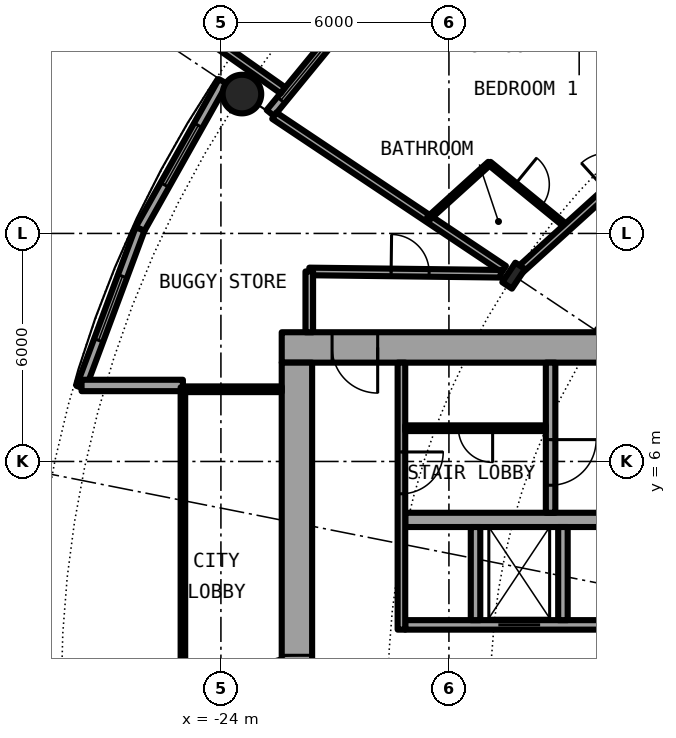
"""IFC4 building model, lengths in metres.
Left out: names, types, materials, properties, quantities, classifications, styles, units other than length and angle.
Written with IfcOpenShell. Run it as: python <this file> out.ifc"""

import sys

from ifc_helpers import new_model, si_unit, direction, frame, frame_2d, origin, origin_2d, place, context, subcontext, project, spatial, rectangle, hollow_circle, i_section, extrude, element, fill, save


model = new_model("IFC4")
c1 = context("Model", 3, precision=1e-05, world=origin(), true_north=direction((0.0, 1.0)))
c2 = subcontext(c1, "Body", "Model", "MODEL_VIEW")
j1 = project(units=[si_unit("LENGTHUNIT", "METRE"), si_unit("PLANEANGLEUNIT", "RADIAN")], contexts=[c1])
p1 = place(None, origin())
s1 = spatial("IfcSite", under=j1, at=p1, CompositionType="ELEMENT")
p2 = place(p1, origin())
s2 = spatial("IfcBuilding", under=s1, at=p2, CompositionType="ELEMENT")
p3 = place(p2, frame((0.0, 0.0, 35.0)))
s3 = spatial("IfcBuildingStorey", under=s2, at=p3, CompositionType="ELEMENT", Elevation=35.0)
p4 = place(p3, frame((-23.448, 15.667, 0.0), z_axis=(0.0, 0.0, 1.0), x_axis=(1.0, 0.0, 0.0)))
e1 = element("IfcColumn", 1, at=p4, inside=s3, PredefinedType="COLUMN", context=c2, shape_type="SweptSolid", body=[
    extrude(hollow_circle(Radius=0.508, WallThickness=0.05, at=origin_2d()), origin(), (0.0, 0.0, 1.0), 3.05),
])
p5 = place(p3, frame((-16.297, 10.889, 0.0), z_axis=(0.0, 0.0, 1.0), x_axis=(-0.831469612303, 0.55557023302, 0.0)))
e2 = element("IfcColumn", 2, at=p5, inside=s3, PredefinedType="COLUMN", context=c2, shape_type="SweptSolid", body=[
    extrude(i_section(OverallWidth=0.305, OverallDepth=0.62, WebThickness=0.021, FlangeThickness=0.04, FilletRadius=0.027, at=origin_2d()), origin(), (0.0, 0.0, 1.0), 3.05),
])
p6 = place(p3, frame((-19.304, 19.304, 0.0), z_axis=(0.0, 0.0, 1.0), x_axis=(-0.634382322723, -0.773019449054, 0.0)))
e3 = element("IfcWall", 3, at=p6, inside=s3, PredefinedType="SOLIDWALL", context=c2, shape_type="SweptSolid", body=[
    extrude(rectangle(XDim=5.352, YDim=0.25, at=frame_2d((2.676, 0.0))), origin(), (0.0, 0.0, 1.0), 2.7),
])
p7 = place(p6, frame((0.841, 0.0, 0.0)))
e4 = element("IfcOpeningElement", 4, at=p7, cuts=e3, PredefinedType="OPENING", context=c2, shape_type="SweptSolid", body=[
    extrude(rectangle(XDim=1.0, YDim=2.2, at=frame_2d((0.5, 1.1))), frame((0.0, 0.135, 0.0), z_axis=(0.0, -1.0, 0.0), x_axis=(1.0, 0.0, 0.0)), (0.0, 0.0, 1.0), 0.27),
])
p8 = place(p6, frame((3.111, 0.0, 0.3)))
e5 = element("IfcOpeningElement", 5, at=p8, cuts=e3, PredefinedType="OPENING", context=c2, shape_type="SweptSolid", body=[
    extrude(rectangle(XDim=1.8, YDim=2.1, at=frame_2d((0.9, 1.05))), frame((0.0, 0.135, 0.0), z_axis=(0.0, -1.0, 0.0), x_axis=(1.0, 0.0, 0.0)), (0.0, 0.0, 1.0), 0.27),
])
p9 = place(p3, frame((-22.37, 15.765, -0.03), z_axis=(0.0, 0.0, 1.0), x_axis=(-0.817256123454, 0.576274612209, 0.0)))
e6 = element("IfcWall", 6, at=p9, inside=s3, PredefinedType="SOLIDWALL", context=c2, shape_type="SweptSolid", body=[
    extrude(rectangle(XDim=2.933, YDim=0.2, at=frame_2d((1.466, 0.0))), origin(), (0.0, 0.0, 1.0), 2.73),
])
p10 = place(p3, frame((-23.946, 16.0, 0.0), z_axis=(0.0, 0.0, 1.0), x_axis=(-0.489696356642, -0.871893042919, 0.0)))
e7 = element("IfcWall", 7, at=p10, inside=s3, PredefinedType="SOLIDWALL", context=c2, shape_type="SweptSolid", body=[
    extrude(rectangle(XDim=4.454, YDim=0.25, at=frame_2d((2.227, 0.0))), origin(), (0.0, 0.0, 1.0), 2.7),
])
p11 = place(p10, frame((1.327, 0.0, 0.3)))
e8 = element("IfcOpeningElement", 8, at=p11, cuts=e7, PredefinedType="OPENING", context=c2, shape_type="SweptSolid", body=[
    extrude(rectangle(XDim=1.8, YDim=2.1, at=frame_2d((0.9, 1.05))), frame((0.0, 0.135, 0.0), z_axis=(0.0, -1.0, 0.0), x_axis=(1.0, 0.0, 0.0)), (0.0, 0.0, 1.0), 0.27),
])
p12 = place(p3, frame((-26.127, 12.117, 0.0), z_axis=(0.0, 0.0, 1.0), x_axis=(-0.349247811493, -0.937030397675, 0.0)))
e9 = element("IfcWall", 9, at=p12, inside=s3, PredefinedType="SOLIDWALL", context=c2, shape_type="SweptSolid", body=[
    extrude(rectangle(XDim=4.452, YDim=0.25, at=frame_2d((2.226, 0.0))), origin(), (0.0, 0.0, 1.0), 2.7),
])
p13 = place(p12, frame((1.327, 0.0, 0.3)))
e10 = element("IfcOpeningElement", 10, at=p13, cuts=e9, PredefinedType="OPENING", context=c2, shape_type="SweptSolid", body=[
    extrude(rectangle(XDim=1.8, YDim=2.1, at=frame_2d((0.9, 1.05))), frame((0.0, 0.135, 0.0), z_axis=(0.0, -1.0, 0.0), x_axis=(1.0, 0.0, 0.0)), (0.0, 0.0, 1.0), 0.27),
])
p14 = place(p3, frame((-25.0, 8.0, 0.0), z_axis=(0.0, 0.0, 1.0), x_axis=(-1.0, 0.0, 0.0)))
e11 = element("IfcWall", 11, at=p14, inside=s3, PredefinedType="SOLIDWALL", context=c2, shape_type="SweptSolid", body=[
    extrude(rectangle(XDim=2.667, YDim=0.3, at=frame_2d((1.333, 0.0))), origin(), (0.0, 0.0, 1.0), 2.7),
])
p15 = place(p3, frame((-8.2, 9.0, 0.0), z_axis=(0.0, 0.0, 1.0), x_axis=(-1.0, 0.0, 0.0)))
e12 = element("IfcWall", 12, at=p15, inside=s3, PredefinedType="SHEAR", context=c2, shape_type="SweptSolid", body=[
    extrude(rectangle(XDim=14.2, YDim=0.8, at=frame_2d((7.1, 0.0))), origin(), (0.0, 0.0, 1.0), 3.05),
])
p16 = place(p15, frame((11.675, 0.0, 0.0)))
e13 = element("IfcOpeningElement", 13, at=p16, cuts=e12, PredefinedType="OPENING", context=c2, shape_type="SweptSolid", body=[
    extrude(rectangle(XDim=1.2, YDim=2.3, at=frame_2d((0.6, 1.15))), frame((0.0, 0.41, 0.0), z_axis=(0.0, -1.0, 0.0), x_axis=(1.0, 0.0, 0.0)), (0.0, 0.0, 1.0), 0.82),
])
p17 = place(p3, frame((-22.0, -8.6, 0.0), z_axis=(0.0, 0.0, 1.0), x_axis=(0.0, 1.0, 0.0)))
e14 = element("IfcWall", 14, at=p17, inside=s3, PredefinedType="SHEAR", context=c2, shape_type="SweptSolid", body=[
    extrude(rectangle(XDim=17.2, YDim=0.8, at=frame_2d((8.6, 0.0))), origin(), (0.0, 0.0, 1.0), 3.05),
])
p18 = place(p17, frame((7.7, 0.0, 0.0)))
e15 = element("IfcOpeningElement", 15, at=p18, cuts=e14, PredefinedType="OPENING", context=c2, shape_type="SweptSolid", body=[
    extrude(rectangle(XDim=1.8, YDim=2.3, at=frame_2d((0.9, 1.15))), frame((0.0, 0.41, 0.0), z_axis=(0.0, -1.0, 0.0), x_axis=(1.0, 0.0, 0.0)), (0.0, 0.0, 1.0), 0.82),
])
p19 = place(p3, frame((-19.15, 1.7, 0.0), z_axis=(0.0, 0.0, 1.0), x_axis=(1.0, 0.0, 0.0)))
e16 = element("IfcWall", 16, at=p19, inside=s3, PredefinedType="SHEAR", context=c2, shape_type="SweptSolid", body=[
    extrude(rectangle(XDim=10.15, YDim=0.25, at=frame_2d((5.075, 0.0))), origin(), (0.0, 0.0, 1.0), 3.05),
])
p20 = place(p19, frame((2.45, 0.0, 0.0)))
e17 = element("IfcOpeningElement", 17, at=p20, cuts=e16, PredefinedType="OPENING", context=c2, shape_type="SweptSolid", body=[
    extrude(rectangle(XDim=1.1, YDim=2.3, at=frame_2d((0.55, 1.15))), frame((0.0, 0.135, 0.0), z_axis=(0.0, -1.0, 0.0), x_axis=(1.0, 0.0, 0.0)), (0.0, 0.0, 1.0), 0.27),
])
p21 = place(p19, frame((9.137, 0.0, 0.0)))
e18 = element("IfcOpeningElement", 18, at=p21, cuts=e16, PredefinedType="OPENING", context=c2, shape_type="SweptSolid", body=[
    extrude(rectangle(XDim=0.9, YDim=2.3, at=frame_2d((0.45, 1.15))), frame((0.0, 0.135, 0.0), z_axis=(0.0, -1.0, 0.0), x_axis=(1.0, 0.0, 0.0)), (0.0, 0.0, 1.0), 0.27),
])
p22 = place(p19, frame((7.5, 0.0, 0.0)))
e19 = element("IfcOpeningElement", 19, at=p22, cuts=e16, PredefinedType="OPENING", context=c2, shape_type="SweptSolid", body=[
    extrude(rectangle(XDim=0.9, YDim=2.3, at=frame_2d((0.45, 1.15))), frame((0.0, 0.135, 0.0), z_axis=(0.0, -1.0, 0.0), x_axis=(1.0, 0.0, 0.0)), (0.0, 0.0, 1.0), 0.27),
])
p23 = place(p19, frame((5.125, 0.0, 0.0)))
e20 = element("IfcOpeningElement", 20, at=p23, cuts=e16, PredefinedType="OPENING", context=c2, shape_type="SweptSolid", body=[
    extrude(rectangle(XDim=0.9, YDim=2.3, at=frame_2d((0.45, 1.15))), frame((0.0, 0.135, 0.0), z_axis=(0.0, -1.0, 0.0), x_axis=(1.0, 0.0, 0.0)), (0.0, 0.0, 1.0), 0.27),
])
p24 = place(p3, frame((-9.0, 4.462, 0.0), z_axis=(0.0, 0.0, 1.0), x_axis=(-1.0, 0.0, 0.0)))
e21 = element("IfcWall", 21, at=p24, inside=s3, PredefinedType="SHEAR", context=c2, shape_type="SweptSolid", body=[
    extrude(rectangle(XDim=10.15, YDim=0.375, at=frame_2d((5.075, 0.0))), origin(), (0.0, 0.0, 1.0), 3.05),
])
p25 = place(p3, frame((-15.325, 8.6, 0.0), z_axis=(0.0, 0.0, 1.0), x_axis=(0.0, -1.0, 0.0)))
e22 = element("IfcWall", 22, at=p25, inside=s3, PredefinedType="SHEAR", context=c2, shape_type="SweptSolid", body=[
    extrude(rectangle(XDim=3.95, YDim=0.25, at=frame_2d((1.975, 0.0))), origin(), (0.0, 0.0, 1.0), 3.05),
])
p26 = place(p25, frame((2.025, 0.0, 0.0)))
e23 = element("IfcOpeningElement", 23, at=p26, cuts=e22, PredefinedType="OPENING", context=c2, shape_type="SweptSolid", body=[
    extrude(rectangle(XDim=1.2, YDim=2.3, at=frame_2d((0.6, 1.15))), frame((0.0, 0.135, 0.0), z_axis=(0.0, -1.0, 0.0), x_axis=(1.0, 0.0, 0.0)), (0.0, 0.0, 1.0), 0.27),
])
for number, where, z_axis, x_axis in (
    (24, (-15.0, 1.825, 0.0), (0.0, 0.0, 1.0), (0.0, 1.0, 0.0)),
    (25, (-17.3, 1.825, 0.0), (0.0, 0.0, 1.0), (0.0, 1.0, 0.0)),
):
    element("IfcWall", number, at=place(p3, frame(where, z_axis=z_axis, x_axis=x_axis)), inside=s3, PredefinedType="SOLIDWALL", context=c2, shape_type="SweptSolid", body=[
        extrude(rectangle(XDim=2.45, YDim=0.25, at=frame_2d((1.225, 0.0))), origin(), (0.0, 0.0, 1.0), 2.7),
    ])
p27 = place(p3, frame((-19.25, 8.6, 0.0), z_axis=(0.0, 0.0, 1.0), x_axis=(0.0, -1.0, 0.0)))
e26 = element("IfcWall", 26, at=p27, inside=s3, PredefinedType="SOLIDWALL", context=c2, shape_type="SweptSolid", body=[
    extrude(rectangle(XDim=7.025, YDim=0.2, at=frame_2d((3.513, 0.0))), origin(), (0.0, 0.0, 1.0), 2.7),
])
p28 = place(p27, frame((2.35, 0.0, 0.0)))
e27 = element("IfcOpeningElement", 27, at=p28, cuts=e26, PredefinedType="OPENING", context=c2, shape_type="SweptSolid", body=[
    extrude(rectangle(XDim=1.1, YDim=2.3, at=frame_2d((0.55, 1.15))), frame((0.0, 0.11, 0.0), z_axis=(0.0, -1.0, 0.0), x_axis=(1.0, 0.0, 0.0)), (0.0, 0.0, 1.0), 0.22),
])
p29 = place(p3, frame((-15.45, 6.875, 0.0), z_axis=(0.0, 0.0, 1.0), x_axis=(-1.0, 0.0, 0.0)))
e28 = element("IfcWall", 28, at=p29, inside=s3, PredefinedType="PARTITIONING", context=c2, shape_type="SweptSolid", body=[
    extrude(rectangle(XDim=3.7, YDim=0.15, at=frame_2d((1.85, 0.0))), origin(), (0.0, 0.0, 1.0), 2.7),
])
p30 = place(p29, frame((1.4, 0.0, 0.0)))
e29 = element("IfcOpeningElement", 29, at=p30, cuts=e28, PredefinedType="OPENING", context=c2, shape_type="SweptSolid", body=[
    extrude(rectangle(XDim=0.9, YDim=2.3, at=frame_2d((0.45, 1.15))), frame((0.0, 0.085, 0.0), z_axis=(0.0, -1.0, 0.0), x_axis=(1.0, 0.0, 0.0)), (0.0, 0.0, 1.0), 0.17),
])
p31 = place(p3, frame((-22.4, 7.9, 0.0), z_axis=(0.0, 0.0, 1.0), x_axis=(-1.0, 0.0, 0.0)))
e30 = element("IfcWall", 30, at=p31, inside=s3, PredefinedType="PARTITIONING", context=c2, shape_type="SweptSolid", body=[
    extrude(rectangle(XDim=2.54, YDim=0.15, at=frame_2d((1.27, 0.0))), origin(), (0.0, 0.0, 1.0), 2.7),
])
p32 = place(p3, frame((-25.0, 7.95, 0.0), z_axis=(0.0, 0.0, 1.0), x_axis=(0.0, -1.0, 0.0)))
e31 = element("IfcWall", 31, at=p32, inside=s3, PredefinedType="PARTITIONING", context=c2, shape_type="SweptSolid", body=[
    extrude(rectangle(XDim=15.9, YDim=0.12, at=frame_2d((7.95, 0.0))), origin(), (0.0, 0.0, 1.0), 2.7),
])
p33 = place(p32, frame((0.95, 0.0, 0.1)))
e32 = element("IfcOpeningElement", 32, at=p33, cuts=e31, PredefinedType="OPENING", context=c2, shape_type="SweptSolid", body=[
    extrude(rectangle(XDim=14.0, YDim=2.35, at=frame_2d((7.0, 1.175))), frame((0.0, 0.07, 0.0), z_axis=(0.0, -1.0, 0.0), x_axis=(1.0, 0.0, 0.0)), (0.0, 0.0, 1.0), 0.14),
])
p34 = place(p3, frame((-22.595, 15.098, 0.0), z_axis=(0.0, 0.0, 1.0), x_axis=(0.831403467378, -0.55566921314, 0.0)))
e33 = element("IfcWall", 33, at=p34, inside=s3, PredefinedType="PARTITIONING", context=c2, shape_type="SweptSolid", body=[
    extrude(rectangle(XDim=7.265, YDim=0.2, at=frame_2d((3.632, 0.0))), origin(), (0.0, 0.0, 1.0), 2.7),
])
p35 = place(p3, frame((-17.219, 21.023, 0.0), z_axis=(0.0, 0.0, 1.0), x_axis=(0.633664062855, -0.773608334654, 0.0)))
e34 = element("IfcWall", 34, at=p35, inside=s3, PredefinedType="PARTITIONING", context=c2, shape_type="SweptSolid", body=[
    extrude(rectangle(XDim=8.138, YDim=0.1, at=frame_2d((4.069, 0.0))), origin(), (0.0, 0.0, 1.0), 2.7),
])
p36 = place(p35, frame((6.377, 0.0, 0.0)))
e35 = element("IfcOpeningElement", 35, at=p36, cuts=e34, PredefinedType="OPENING", context=c2, shape_type="SweptSolid", body=[
    extrude(rectangle(XDim=0.9, YDim=2.3, at=frame_2d((0.45, 1.15))), frame((0.0, 0.06, 0.0), z_axis=(0.0, -1.0, 0.0), x_axis=(1.0, 0.0, 0.0)), (0.0, 0.0, 1.0), 0.12),
])
p37 = place(p35, frame((2.308, 0.0, 0.0)))
e36 = element("IfcOpeningElement", 36, at=p37, cuts=e34, PredefinedType="OPENING", context=c2, shape_type="SweptSolid", body=[
    extrude(rectangle(XDim=0.9, YDim=2.3, at=frame_2d((0.45, 1.15))), frame((0.0, 0.06, 0.0), z_axis=(0.0, -1.0, 0.0), x_axis=(1.0, 0.0, 0.0)), (0.0, 0.0, 1.0), 0.12),
])
p38 = place(p3, frame((-16.936, 13.845, 0.0), z_axis=(0.0, 0.0, 1.0), x_axis=(0.774162545943, -0.632986850147, 0.0)))
e37 = element("IfcWall", 37, at=p38, inside=s3, PredefinedType="PARTITIONING", context=c2, shape_type="SweptSolid", body=[
    extrude(rectangle(XDim=2.649, YDim=0.1, at=frame_2d((1.325, 0.0))), origin(), (0.0, 0.0, 1.0), 2.7),
])
p39 = place(p38, frame((0.875, 0.0, 0.0)))
e38 = element("IfcOpeningElement", 38, at=p39, cuts=e37, PredefinedType="OPENING", context=c2, shape_type="SweptSolid", body=[
    extrude(rectangle(XDim=0.9, YDim=2.3, at=frame_2d((0.45, 1.15))), frame((0.0, 0.06, 0.0), z_axis=(0.0, -1.0, 0.0), x_axis=(1.0, 0.0, 0.0)), (0.0, 0.0, 1.0), 0.12),
])
p40 = place(p3, frame((-21.675, 11.0, 0.0), z_axis=(0.0, 0.0, 1.0), x_axis=(0.999926652916, -0.012111514691, 0.0)))
e39 = element("IfcWall", 39, at=p40, inside=s3, PredefinedType="PARTITIONING", context=c2, shape_type="SweptSolid", body=[
    extrude(rectangle(XDim=5.04, YDim=0.2, at=frame_2d((2.52, 0.0))), origin(), (0.0, 0.0, 1.0), 2.7),
])
p41 = place(p40, frame((2.154, 0.0, 0.0)))
e40 = element("IfcOpeningElement", 40, at=p41, cuts=e39, PredefinedType="OPENING", context=c2, shape_type="SweptSolid", body=[
    extrude(rectangle(XDim=1.0, YDim=2.3, at=frame_2d((0.5, 1.15))), frame((0.0, 0.11, 0.0), z_axis=(0.0, -1.0, 0.0), x_axis=(1.0, 0.0, 0.0)), (0.0, 0.0, 1.0), 0.22),
])
p42 = place(p3, frame((-16.18, 10.995, 0.0), z_axis=(0.0, 0.0, 1.0), x_axis=(0.74112906966, 0.671362571272, 0.0)))
e41 = element("IfcWall", 41, at=p42, inside=s3, PredefinedType="PARTITIONING", context=c2, shape_type="SweptSolid", body=[
    extrude(rectangle(XDim=9.375, YDim=0.2, at=frame_2d((4.688, 0.0))), origin(), (0.0, 0.0, 1.0), 2.38),
])
p43 = place(p42, frame((3.152, 0.0, 0.0)))
e42 = element("IfcOpeningElement", 42, at=p43, cuts=e41, PredefinedType="OPENING", context=c2, shape_type="SweptSolid", body=[
    extrude(rectangle(XDim=1.0, YDim=2.3, at=frame_2d((0.5, 1.15))), frame((0.0, 0.11, 0.0), z_axis=(0.0, -1.0, 0.0), x_axis=(1.0, 0.0, 0.0)), (0.0, 0.0, 1.0), 0.22),
])
p44 = place(p3, frame((-18.54, 12.392, 0.0), z_axis=(0.0, 0.0, 1.0), x_axis=(0.741319612235, 0.671152167929, 0.0)))
e43 = element("IfcWall", 43, at=p44, inside=s3, PredefinedType="PARTITIONING", context=c2, shape_type="SweptSolid", body=[
    extrude(rectangle(XDim=2.168, YDim=0.1, at=frame_2d((1.084, 0.0))), origin(), (0.0, 0.0, 1.0), 2.7),
])
p45 = place(p3, frame((-21.675, 9.4, 0.0), z_axis=(0.0, 0.0, 1.0), x_axis=(0.0, 1.0, 0.0)))
e44 = element("IfcWall", 44, at=p45, inside=s3, PredefinedType="PARTITIONING", context=c2, shape_type="SweptSolid", body=[
    extrude(rectangle(XDim=1.6, YDim=0.2, at=frame_2d((0.8, 0.0))), origin(), (0.0, 0.0, 1.0), 2.7),
])
p46 = place(p8, origin())
e45 = element("IfcWindow", 45, at=p46, inside=s3, PartitioningType="SINGLE_PANEL", PredefinedType="WINDOW", context=c2, shape_type="SweptSolid", body=[
    extrude(rectangle(XDim=1.8, YDim=2.1, at=frame_2d((0.9, 1.05))), frame((0.0, 0.03, 0.0), z_axis=(0.0, -1.0, 0.0), x_axis=(1.0, 0.0, 0.0)), (0.0, 0.0, 1.0), 0.06),
])
fill(e5, e45)
p47 = place(p11, origin())
e46 = element("IfcWindow", 46, at=p47, inside=s3, PartitioningType="SINGLE_PANEL", PredefinedType="WINDOW", context=c2, shape_type="SweptSolid", body=[
    extrude(rectangle(XDim=1.8, YDim=2.1, at=frame_2d((0.9, 1.05))), frame((0.0, 0.03, 0.0), z_axis=(0.0, -1.0, 0.0), x_axis=(1.0, 0.0, 0.0)), (0.0, 0.0, 1.0), 0.06),
])
fill(e8, e46)
p48 = place(p13, origin())
e47 = element("IfcWindow", 47, at=p48, inside=s3, PartitioningType="SINGLE_PANEL", PredefinedType="WINDOW", context=c2, shape_type="SweptSolid", body=[
    extrude(rectangle(XDim=1.8, YDim=2.1, at=frame_2d((0.9, 1.05))), frame((0.0, 0.03, 0.0), z_axis=(0.0, -1.0, 0.0), x_axis=(1.0, 0.0, 0.0)), (0.0, 0.0, 1.0), 0.06),
])
fill(e10, e47)
p49 = place(p20, origin())
e48 = element("IfcDoor", 48, at=p49, inside=s3, OperationType="DOUBLE_DOOR_SLIDING", PredefinedType="DOOR", context=c2, shape_type="SweptSolid", body=[
    extrude(rectangle(XDim=1.1, YDim=2.3, at=frame_2d((0.55, 1.15))), frame((0.0, 0.025, 0.0), z_axis=(0.0, -1.0, 0.0), x_axis=(1.0, 0.0, 0.0)), (0.0, 0.0, 1.0), 0.05),
])
fill(e17, e48)
p50 = place(p30, origin())
e49 = element("IfcDoor", 49, at=p50, inside=s3, OperationType="SINGLE_SWING_LEFT", PredefinedType="DOOR", context=c2, shape_type="SweptSolid", body=[
    extrude(rectangle(XDim=0.9, YDim=2.3, at=frame_2d((0.45, 1.15))), frame((0.0, 0.025, 0.0), z_axis=(0.0, -1.0, 0.0), x_axis=(1.0, 0.0, 0.0)), (0.0, 0.0, 1.0), 0.05),
])
fill(e29, e49)
p51 = place(p26, origin())
e50 = element("IfcDoor", 50, at=p51, inside=s3, OperationType="SINGLE_SWING_LEFT", PredefinedType="DOOR", context=c2, shape_type="SweptSolid", body=[
    extrude(rectangle(XDim=1.2, YDim=2.3, at=frame_2d((0.6, 1.15))), frame((0.0, 0.025, 0.0), z_axis=(0.0, -1.0, 0.0), x_axis=(1.0, 0.0, 0.0)), (0.0, 0.0, 1.0), 0.05),
])
fill(e23, e50)
p52 = place(p28, origin())
e51 = element("IfcDoor", 51, at=p52, inside=s3, OperationType="SINGLE_SWING_RIGHT", PredefinedType="DOOR", context=c2, shape_type="SweptSolid", body=[
    extrude(rectangle(XDim=1.1, YDim=2.3, at=frame_2d((0.55, 1.15))), frame((0.0, 0.025, 0.0), z_axis=(0.0, -1.0, 0.0), x_axis=(1.0, 0.0, 0.0)), (0.0, 0.0, 1.0), 0.05),
])
fill(e27, e51)
p53 = place(p16, origin())
e52 = element("IfcDoor", 52, at=p53, inside=s3, OperationType="SINGLE_SWING_LEFT", PredefinedType="DOOR", context=c2, shape_type="SweptSolid", body=[
    extrude(rectangle(XDim=1.2, YDim=2.3, at=frame_2d((0.6, 1.15))), frame((0.0, 0.025, 0.0), z_axis=(0.0, -1.0, 0.0), x_axis=(1.0, 0.0, 0.0)), (0.0, 0.0, 1.0), 0.05),
])
fill(e13, e52)
p54 = place(p18, origin())
e53 = element("IfcDoor", 53, at=p54, inside=s3, OperationType="SINGLE_SWING_LEFT", PredefinedType="DOOR", context=c2, shape_type="SweptSolid", body=[
    extrude(rectangle(XDim=1.8, YDim=2.3, at=frame_2d((0.9, 1.15))), frame((0.0, 0.025, 0.0), z_axis=(0.0, -1.0, 0.0), x_axis=(1.0, 0.0, 0.0)), (0.0, 0.0, 1.0), 0.05),
])
fill(e15, e53)
p55 = place(p33, origin())
e54 = element("IfcWindow", 54, at=p55, inside=s3, PartitioningType="SINGLE_PANEL", PredefinedType="WINDOW", context=c2, shape_type="SweptSolid", body=[
    extrude(rectangle(XDim=14.0, YDim=2.35, at=frame_2d((7.0, 1.175))), frame((0.0, 0.03, 0.0), z_axis=(0.0, -1.0, 0.0), x_axis=(1.0, 0.0, 0.0)), (0.0, 0.0, 1.0), 0.06),
])
fill(e32, e54)
p56 = place(p39, origin())
e55 = element("IfcDoor", 55, at=p56, inside=s3, OperationType="SINGLE_SWING_LEFT", PredefinedType="DOOR", context=c2, shape_type="SweptSolid", body=[
    extrude(rectangle(XDim=0.9, YDim=2.3, at=frame_2d((0.45, 1.15))), frame((0.0, 0.025, 0.0), z_axis=(0.0, -1.0, 0.0), x_axis=(1.0, 0.0, 0.0)), (0.0, 0.0, 1.0), 0.05),
])
fill(e38, e55)
p57 = place(p41, origin())
e56 = element("IfcDoor", 56, at=p57, inside=s3, OperationType="SINGLE_SWING_RIGHT", PredefinedType="DOOR", context=c2, shape_type="SweptSolid", body=[
    extrude(rectangle(XDim=1.0, YDim=2.3, at=frame_2d((0.5, 1.15))), frame((0.0, 0.025, 0.0), z_axis=(0.0, -1.0, 0.0), x_axis=(1.0, 0.0, 0.0)), (0.0, 0.0, 1.0), 0.05),
])
fill(e40, e56)
save(model, sys.argv[1])
